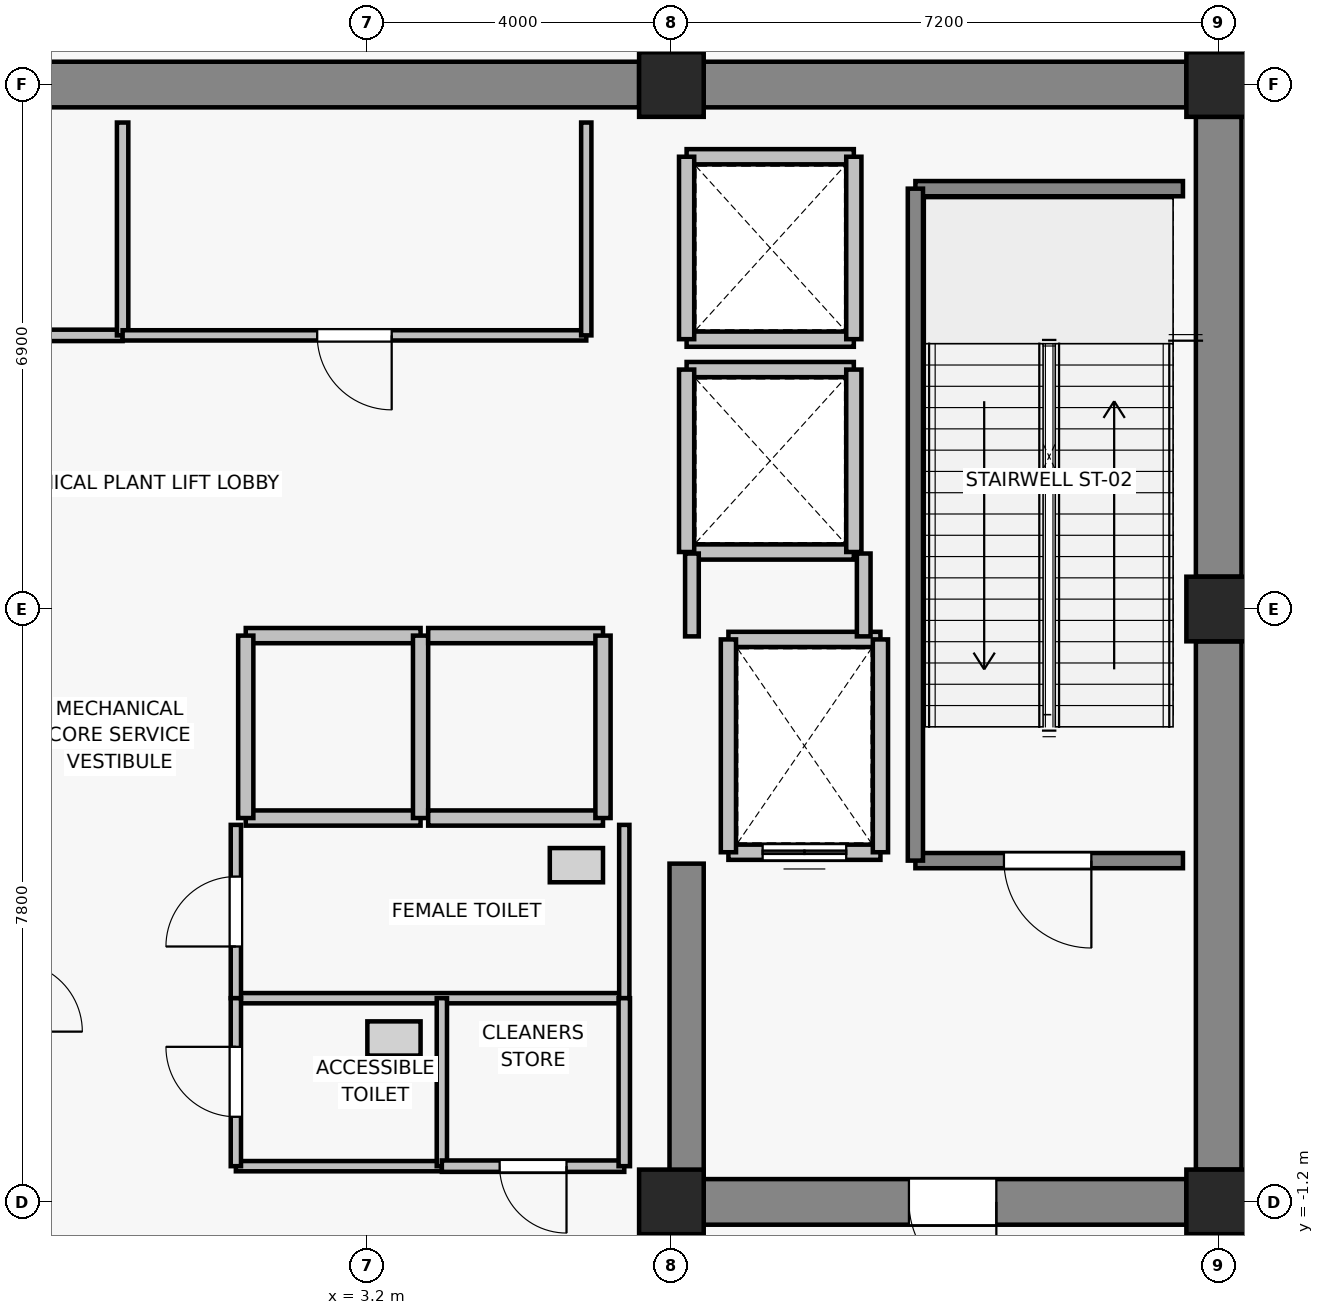
"""IFC4 building model, lengths in metres.
Left out: names, types, materials, properties, quantities, classifications, styles, units other than length and angle.
Written with IfcOpenShell. Run it as: python <this file> out.ifc"""

import sys

from ifc_helpers import new_model, si_unit, direction, frame, frame_2d, origin, origin_2d, place, context, subcontext, project, spatial, rectangle, extrude, source, transform, mapped, element, fill, save


model = new_model("IFC4")
c1 = context("Model", 3, precision=1e-05, world=origin(), true_north=direction((0.0, 1.0)))
c2 = subcontext(c1, "Body", "Model", "MODEL_VIEW")
j1 = project(units=[si_unit("LENGTHUNIT", "METRE"), si_unit("PLANEANGLEUNIT", "RADIAN")], contexts=[c1])
p1 = place(None, origin())
s1 = spatial("IfcSite", under=j1, at=p1, CompositionType="ELEMENT")
p2 = place(p1, origin())
s2 = spatial("IfcBuilding", under=s1, at=p2, CompositionType="ELEMENT")
p3 = place(p2, frame((0.0, 0.0, 199.0)))
s3 = spatial("IfcBuildingStorey", under=s2, at=p3, CompositionType="ELEMENT", Elevation=199.0)
for number, where, z_axis, x_axis in (
    (1, (7.2, -1.2, 0.0), (0.0, 0.0, 1.0), (1.0, 0.0, 0.0)),
    (2, (14.4, -1.2, 0.0), (0.0, 0.0, 1.0), (1.0, 0.0, 0.0)),
    (3, (14.4, 6.6, 0.0), (0.0, 0.0, 1.0), (1.0, 0.0, 0.0)),
    (4, (7.2, 13.5, 0.0), (0.0, 0.0, 1.0), (1.0, 0.0, 0.0)),
    (5, (14.4, 13.5, 0.0), (0.0, 0.0, 1.0), (1.0, 0.0, 0.0)),
):
    element("IfcColumn", number, at=place(p3, frame(where, z_axis=z_axis, x_axis=x_axis)), inside=s3, PredefinedType="COLUMN", context=c2, shape_type="SweptSolid", body=[
        extrude(rectangle(XDim=0.85, YDim=0.85, at=origin_2d()), origin(), (0.0, 0.0, 1.0), 6.6),
    ])
p4 = place(p3, frame((-6.775, 13.5, 0.0), z_axis=(0.0, 0.0, 1.0), x_axis=(1.0, 0.0, 0.0)))
e6 = element("IfcWall", 6, at=p4, inside=s3, PredefinedType="SHEAR", context=c2, shape_type="SweptSolid", body=[
    extrude(rectangle(XDim=13.55, YDim=0.6, at=frame_2d((6.775, 0.0))), origin(), (0.0, 0.0, 1.0), 6.35),
])
p5 = place(p3, frame((7.625, 13.5, 0.0), z_axis=(0.0, 0.0, 1.0), x_axis=(1.0, 0.0, 0.0)))
e7 = element("IfcWall", 7, at=p5, inside=s3, PredefinedType="SHEAR", context=c2, shape_type="SweptSolid", body=[
    extrude(rectangle(XDim=6.35, YDim=0.6, at=frame_2d((3.175, 0.0))), origin(), (0.0, 0.0, 1.0), 6.35),
])
p6 = place(p3, frame((14.4, -0.775, 0.0), z_axis=(0.0, 0.0, 1.0), x_axis=(0.0, 1.0, 0.0)))
e8 = element("IfcWall", 8, at=p6, inside=s3, PredefinedType="SHEAR", context=c2, shape_type="SweptSolid", body=[
    extrude(rectangle(XDim=6.95, YDim=0.6, at=frame_2d((3.475, 0.0))), origin(), (0.0, 0.0, 1.0), 6.35),
])
p7 = place(p3, frame((14.4, 7.025, 0.0), z_axis=(0.0, 0.0, 1.0), x_axis=(0.0, 1.0, 0.0)))
e9 = element("IfcWall", 9, at=p7, inside=s3, PredefinedType="SHEAR", context=c2, shape_type="SweptSolid", body=[
    extrude(rectangle(XDim=6.05, YDim=0.6, at=frame_2d((3.025, 0.0))), origin(), (0.0, 0.0, 1.0), 6.35),
])
p8 = place(p3, frame((13.975, -1.2, 0.0), z_axis=(0.0, 0.0, 1.0), x_axis=(-1.0, 0.0, 0.0)))
e10 = element("IfcWall", 10, at=p8, inside=s3, PredefinedType="SHEAR", context=c2, shape_type="SweptSolid", body=[
    extrude(rectangle(XDim=6.35, YDim=0.6, at=frame_2d((3.175, 0.0))), origin(), (0.0, 0.0, 1.0), 6.35),
])
p9 = place(p8, frame((2.5, 0.0, 0.0)))
e11 = element("IfcOpeningElement", 11, at=p9, cuts=e10, PredefinedType="OPENING", context=c2, shape_type="SweptSolid", body=[
    extrude(rectangle(XDim=1.15, YDim=2.15, at=frame_2d((0.575, 1.075))), frame((0.0, 0.31, 0.0), z_axis=(0.0, -1.0, 0.0), x_axis=(1.0, 0.0, 0.0)), (0.0, 0.0, 1.0), 0.62),
])
p10 = place(p3, frame((7.4, -0.9, 0.0), z_axis=(0.0, 0.0, 1.0), x_axis=(0.0, 1.0, 0.0)))
e12 = element("IfcWall", 12, at=p10, inside=s3, PredefinedType="SHEAR", context=c2, shape_type="SweptSolid", body=[
    extrude(rectangle(XDim=4.15, YDim=0.45, at=frame_2d((2.075, 0.0))), origin(), (0.0, 0.0, 1.0), 6.35),
])
p11 = place(p3, frame((9.95, 3.4, 0.0), z_axis=(0.0, 0.0, 1.0), x_axis=(-1.0, 0.0, 0.0)))
e13 = element("IfcWall", 13, at=p11, inside=s3, PredefinedType="SOLIDWALL", context=c2, shape_type="SweptSolid", body=[
    extrude(rectangle(XDim=2.0, YDim=0.2, at=frame_2d((1.0, 0.0))), origin(), (0.0, 0.0, 1.0), 6.35),
])
p12 = place(p11, frame((0.45, 0.0, 0.0)))
e14 = element("IfcOpeningElement", 14, at=p12, cuts=e13, PredefinedType="OPENING", context=c2, shape_type="SweptSolid", body=[
    extrude(rectangle(XDim=1.1, YDim=2.2, at=frame_2d((0.55, 1.1))), frame((0.0, 0.11, 0.0), z_axis=(0.0, -1.0, 0.0), x_axis=(1.0, 0.0, 0.0)), (0.0, 0.0, 1.0), 0.22),
])
p13 = place(p3, frame((7.95, 6.2, 0.0), z_axis=(0.0, 0.0, 1.0), x_axis=(1.0, 0.0, 0.0)))
e15 = element("IfcWall", 15, at=p13, inside=s3, PredefinedType="SOLIDWALL", context=c2, shape_type="SweptSolid", body=[
    extrude(rectangle(XDim=2.0, YDim=0.2, at=frame_2d((1.0, 0.0))), origin(), (0.0, 0.0, 1.0), 6.35),
])
for number, where, z_axis, x_axis in (
    (16, (7.95, 3.4, 0.0), (0.0, 0.0, 1.0), (0.0, 1.0, 0.0)),
    (17, (9.95, 6.2, 0.0), (0.0, 0.0, 1.0), (0.0, -1.0, 0.0)),
):
    element("IfcWall", number, at=place(p3, frame(where, z_axis=z_axis, x_axis=x_axis)), inside=s3, PredefinedType="SOLIDWALL", context=c2, shape_type="SweptSolid", body=[
        extrude(rectangle(XDim=2.8, YDim=0.2, at=frame_2d((1.4, 0.0))), origin(), (0.0, 0.0, 1.0), 6.35),
    ])
for number, where, z_axis, x_axis in (
    (18, (3.9, 3.85, 0.0), (0.0, 0.0, 1.0), (-1.0, 0.0, 0.0)),
    (19, (1.6, 6.25, 0.0), (0.0, 0.0, 1.0), (1.0, 0.0, 0.0)),
):
    element("IfcWall", number, at=place(p3, frame(where, z_axis=z_axis, x_axis=x_axis)), inside=s3, PredefinedType="SOLIDWALL", context=c2, shape_type="SweptSolid", body=[
        extrude(rectangle(XDim=2.3, YDim=0.2, at=frame_2d((1.15, 0.0))), origin(), (0.0, 0.0, 1.0), 6.35),
    ])
for number, where, z_axis, x_axis in (
    (20, (1.6, 3.85, 0.0), (0.0, 0.0, 1.0), (0.0, 1.0, 0.0)),
    (21, (3.9, 6.25, 0.0), (0.0, 0.0, 1.0), (0.0, -1.0, 0.0)),
):
    element("IfcWall", number, at=place(p3, frame(where, z_axis=z_axis, x_axis=x_axis)), inside=s3, PredefinedType="SOLIDWALL", context=c2, shape_type="SweptSolid", body=[
        extrude(rectangle(XDim=2.4, YDim=0.2, at=frame_2d((1.2, 0.0))), origin(), (0.0, 0.0, 1.0), 6.35),
    ])
for number, where, z_axis, x_axis in (
    (22, (6.3, 3.85, 0.0), (0.0, 0.0, 1.0), (-1.0, 0.0, 0.0)),
    (23, (4.0, 6.25, 0.0), (0.0, 0.0, 1.0), (1.0, 0.0, 0.0)),
):
    element("IfcWall", number, at=place(p3, frame(where, z_axis=z_axis, x_axis=x_axis)), inside=s3, PredefinedType="SOLIDWALL", context=c2, shape_type="SweptSolid", body=[
        extrude(rectangle(XDim=2.3, YDim=0.2, at=frame_2d((1.15, 0.0))), origin(), (0.0, 0.0, 1.0), 6.35),
    ])
p14 = place(p3, frame((6.3, 6.25, 0.0), z_axis=(0.0, 0.0, 1.0), x_axis=(0.0, -1.0, 0.0)))
e24 = element("IfcWall", 24, at=p14, inside=s3, PredefinedType="SOLIDWALL", context=c2, shape_type="SweptSolid", body=[
    extrude(rectangle(XDim=2.4, YDim=0.2, at=frame_2d((1.2, 0.0))), origin(), (0.0, 0.0, 1.0), 6.35),
])
for number, where, z_axis, x_axis in (
    (25, (9.6, 7.35, 0.0), (0.0, 0.0, 1.0), (-1.0, 0.0, 0.0)),
    (26, (7.4, 9.75, 0.0), (0.0, 0.0, 1.0), (1.0, 0.0, 0.0)),
):
    element("IfcWall", number, at=place(p3, frame(where, z_axis=z_axis, x_axis=x_axis)), inside=s3, PredefinedType="SOLIDWALL", context=c2, shape_type="SweptSolid", body=[
        extrude(rectangle(XDim=2.2, YDim=0.2, at=frame_2d((1.1, 0.0))), origin(), (0.0, 0.0, 1.0), 5.89),
    ])
p15 = place(p3, frame((7.4, 7.35, 0.0), z_axis=(0.0, 0.0, 1.0), x_axis=(0.0, 1.0, 0.0)))
e27 = element("IfcWall", 27, at=p15, inside=s3, PredefinedType="SOLIDWALL", context=c2, shape_type="SweptSolid", body=[
    extrude(rectangle(XDim=2.4, YDim=0.2, at=frame_2d((1.2, 0.0))), origin(), (0.0, 0.0, 1.0), 5.89),
])
p16 = place(p3, frame((9.6, 9.75, 0.0), z_axis=(0.0, 0.0, 1.0), x_axis=(0.0, -1.0, 0.0)))
e28 = element("IfcWall", 28, at=p16, inside=s3, PredefinedType="SOLIDWALL", context=c2, shape_type="SweptSolid", body=[
    extrude(rectangle(XDim=2.4, YDim=0.2, at=frame_2d((1.2, 0.0))), origin(), (0.0, 0.0, 1.0), 6.35),
])
for number, where, z_axis, x_axis in (
    (29, (9.6, 10.15, 0.0), (0.0, 0.0, 1.0), (-1.0, 0.0, 0.0)),
    (30, (7.4, 12.55, 0.0), (0.0, 0.0, 1.0), (1.0, 0.0, 0.0)),
):
    element("IfcWall", number, at=place(p3, frame(where, z_axis=z_axis, x_axis=x_axis)), inside=s3, PredefinedType="SOLIDWALL", context=c2, shape_type="SweptSolid", body=[
        extrude(rectangle(XDim=2.2, YDim=0.2, at=frame_2d((1.1, 0.0))), origin(), (0.0, 0.0, 1.0), 5.89),
    ])
p17 = place(p3, frame((7.4, 10.15, 0.0), z_axis=(0.0, 0.0, 1.0), x_axis=(0.0, 1.0, 0.0)))
e31 = element("IfcWall", 31, at=p17, inside=s3, PredefinedType="SOLIDWALL", context=c2, shape_type="SweptSolid", body=[
    extrude(rectangle(XDim=2.4, YDim=0.2, at=frame_2d((1.2, 0.0))), origin(), (0.0, 0.0, 1.0), 5.89),
])
p18 = place(p3, frame((9.6, 12.55, 0.0), z_axis=(0.0, 0.0, 1.0), x_axis=(0.0, -1.0, 0.0)))
e32 = element("IfcWall", 32, at=p18, inside=s3, PredefinedType="SOLIDWALL", context=c2, shape_type="SweptSolid", body=[
    extrude(rectangle(XDim=2.4, YDim=0.2, at=frame_2d((1.2, 0.0))), origin(), (0.0, 0.0, 1.0), 6.35),
])
p19 = place(p3, frame((13.93, 3.29, 0.0), z_axis=(0.0, 0.0, 1.0), x_axis=(-1.0, 0.0, 0.0)))
e33 = element("IfcWall", 33, at=p19, inside=s3, PredefinedType="SOLIDWALL", context=c2, shape_type="SweptSolid", body=[
    extrude(rectangle(XDim=3.52, YDim=0.2, at=frame_2d((1.76, 0.0))), origin(), (0.0, 0.0, 1.0), 6.35),
])
p20 = place(p19, frame((1.205, 0.0, 0.0)))
e34 = element("IfcOpeningElement", 34, at=p20, cuts=e33, PredefinedType="OPENING", context=c2, shape_type="SweptSolid", body=[
    extrude(rectangle(XDim=1.15, YDim=2.15, at=frame_2d((0.575, 1.075))), frame((0.0, 0.11, 0.0), z_axis=(0.0, -1.0, 0.0), x_axis=(1.0, 0.0, 0.0)), (0.0, 0.0, 1.0), 0.22),
])
p21 = place(p3, frame((10.41, 12.13, 0.0), z_axis=(0.0, 0.0, 1.0), x_axis=(1.0, 0.0, 0.0)))
e35 = element("IfcWall", 35, at=p21, inside=s3, PredefinedType="SOLIDWALL", context=c2, shape_type="SweptSolid", body=[
    extrude(rectangle(XDim=3.52, YDim=0.2, at=frame_2d((1.76, 0.0))), origin(), (0.0, 0.0, 1.0), 6.35),
])
p22 = place(p3, frame((10.41, 3.29, 0.0), z_axis=(0.0, 0.0, 1.0), x_axis=(0.0, 1.0, 0.0)))
e36 = element("IfcWall", 36, at=p22, inside=s3, PredefinedType="SOLIDWALL", context=c2, shape_type="SweptSolid", body=[
    extrude(rectangle(XDim=8.84, YDim=0.2, at=frame_2d((4.42, 0.0))), origin(), (0.0, 0.0, 1.0), 6.35),
])
p23 = place(p3, frame((7.47, 6.24, 0.0), z_axis=(0.0, 0.0, 1.0), x_axis=(0.0, 1.0, 0.0)))
e37 = element("IfcWall", 37, at=p23, inside=s3, PredefinedType="PARTITIONING", context=c2, shape_type="SweptSolid", body=[
    extrude(rectangle(XDim=1.09, YDim=0.18, at=frame_2d((0.545, 0.0))), origin(), (0.0, 0.0, 1.0), 5.89),
])
p24 = place(p3, frame((9.73, 7.33, 0.0), z_axis=(0.0, 0.0, 1.0), x_axis=(0.0, -1.0, 0.0)))
e38 = element("IfcWall", 38, at=p24, inside=s3, PredefinedType="PARTITIONING", context=c2, shape_type="SweptSolid", body=[
    extrude(rectangle(XDim=1.09, YDim=0.18, at=frame_2d((0.545, 0.0))), origin(), (0.0, 0.0, 1.0), 6.35),
])
p25 = place(p3, frame((-0.02, 10.2, 0.0), z_axis=(0.0, 0.0, 1.0), x_axis=(-1.0, 0.0, 0.0)))
e39 = element("IfcWall", 39, at=p25, inside=s3, PredefinedType="PARTITIONING", context=c2, shape_type="SweptSolid", body=[
    extrude(rectangle(XDim=6.06, YDim=0.15, at=frame_2d((3.03, 0.0))), origin(), (0.0, 0.0, 1.0), 5.89),
])
p26 = place(p25, frame((2.54, 0.0, 0.0)))
e40 = element("IfcOpeningElement", 40, at=p26, cuts=e39, PredefinedType="OPENING", context=c2, shape_type="SweptSolid", body=[
    extrude(rectangle(XDim=0.98, YDim=2.15, at=frame_2d((0.49, 1.075))), frame((0.0, 0.085, 0.0), z_axis=(0.0, -1.0, 0.0), x_axis=(1.0, 0.0, 0.0)), (0.0, 0.0, 1.0), 0.17),
])
p27 = place(p3, frame((-0.02, 13.0, 0.0), z_axis=(0.0, 0.0, 1.0), x_axis=(0.0, -1.0, 0.0)))
e41 = element("IfcWall", 41, at=p27, inside=s3, PredefinedType="PARTITIONING", context=c2, shape_type="SweptSolid", body=[
    extrude(rectangle(XDim=2.8, YDim=0.15, at=frame_2d((1.4, 0.0))), origin(), (0.0, 0.0, 1.0), 5.89),
])
p28 = place(p3, frame((6.08, 10.2, 0.0), z_axis=(0.0, 0.0, 1.0), x_axis=(-1.0, 0.0, 0.0)))
e42 = element("IfcWall", 42, at=p28, inside=s3, PredefinedType="PARTITIONING", context=c2, shape_type="SweptSolid", body=[
    extrude(rectangle(XDim=6.1, YDim=0.135, at=frame_2d((3.05, 0.0))), origin(), (0.0, 0.0, 1.0), 5.89),
])
p29 = place(p28, frame((2.56, 0.0, 0.0)))
e43 = element("IfcOpeningElement", 43, at=p29, cuts=e42, PredefinedType="OPENING", context=c2, shape_type="SweptSolid", body=[
    extrude(rectangle(XDim=0.98, YDim=2.15, at=frame_2d((0.49, 1.075))), frame((0.0, 0.077, 0.0), z_axis=(0.0, -1.0, 0.0), x_axis=(1.0, 0.0, 0.0)), (0.0, 0.0, 1.0), 0.155),
])
p30 = place(p3, frame((6.08, 13.0, 0.0), z_axis=(0.0, 0.0, 1.0), x_axis=(0.0, -1.0, 0.0)))
e44 = element("IfcWall", 44, at=p30, inside=s3, PredefinedType="PARTITIONING", context=c2, shape_type="SweptSolid", body=[
    extrude(rectangle(XDim=2.8, YDim=0.135, at=frame_2d((1.4, 0.0))), origin(), (0.0, 0.0, 1.0), 6.35),
])
p31 = place(p3, frame((6.58, 1.48, 0.0), z_axis=(0.0, 0.0, 1.0), x_axis=(-1.0, 0.0, 0.0)))
e45 = element("IfcWall", 45, at=p31, inside=s3, PredefinedType="PARTITIONING", context=c2, shape_type="SweptSolid", body=[
    extrude(rectangle(XDim=5.11, YDim=0.135, at=frame_2d((2.555, 0.0))), origin(), (0.0, 0.0, 1.0), 6.35),
])
p32 = place(p3, frame((1.47, 1.48, 0.0), z_axis=(0.0, 0.0, 1.0), x_axis=(0.0, 1.0, 0.0)))
e46 = element("IfcWall", 46, at=p32, inside=s3, PredefinedType="PARTITIONING", context=c2, shape_type="SweptSolid", body=[
    extrude(rectangle(XDim=2.28, YDim=0.135, at=frame_2d((1.14, 0.0))), origin(), (0.0, 0.0, 1.0), 6.35),
])
p33 = place(p32, frame((0.68, 0.0, 0.0)))
e47 = element("IfcOpeningElement", 47, at=p33, cuts=e46, PredefinedType="OPENING", context=c2, shape_type="SweptSolid", body=[
    extrude(rectangle(XDim=0.92, YDim=2.1, at=frame_2d((0.46, 1.05))), frame((0.0, 0.077, 0.0), z_axis=(0.0, -1.0, 0.0), x_axis=(1.0, 0.0, 0.0)), (0.0, 0.0, 1.0), 0.155),
])
p34 = place(p3, frame((6.58, 3.76, 0.0), z_axis=(0.0, 0.0, 1.0), x_axis=(0.0, -1.0, 0.0)))
e48 = element("IfcWall", 48, at=p34, inside=s3, PredefinedType="PARTITIONING", context=c2, shape_type="SweptSolid", body=[
    extrude(rectangle(XDim=2.28, YDim=0.135, at=frame_2d((1.14, 0.0))), origin(), (0.0, 0.0, 1.0), 6.35),
])
p35 = place(p3, frame((4.18, -0.73, 0.0), z_axis=(0.0, 0.0, 1.0), x_axis=(-1.0, 0.0, 0.0)))
e49 = element("IfcWall", 49, at=p35, inside=s3, PredefinedType="PARTITIONING", context=c2, shape_type="SweptSolid", body=[
    extrude(rectangle(XDim=2.71, YDim=0.135, at=frame_2d((1.355, 0.0))), origin(), (0.0, 0.0, 1.0), 6.35),
])
p36 = place(p3, frame((1.47, -0.73, 0.0), z_axis=(0.0, 0.0, 1.0), x_axis=(0.0, 1.0, 0.0)))
e50 = element("IfcWall", 50, at=p36, inside=s3, PredefinedType="PARTITIONING", context=c2, shape_type="SweptSolid", body=[
    extrude(rectangle(XDim=2.21, YDim=0.135, at=frame_2d((1.105, 0.0))), origin(), (0.0, 0.0, 1.0), 6.35),
])
p37 = place(p36, frame((0.65, 0.0, 0.0)))
e51 = element("IfcOpeningElement", 51, at=p37, cuts=e50, PredefinedType="OPENING", context=c2, shape_type="SweptSolid", body=[
    extrude(rectangle(XDim=0.92, YDim=2.1, at=frame_2d((0.46, 1.05))), frame((0.0, 0.077, 0.0), z_axis=(0.0, -1.0, 0.0), x_axis=(1.0, 0.0, 0.0)), (0.0, 0.0, 1.0), 0.155),
])
p38 = place(p3, frame((4.18, 1.48, 0.0), z_axis=(0.0, 0.0, 1.0), x_axis=(0.0, -1.0, 0.0)))
e52 = element("IfcWall", 52, at=p38, inside=s3, PredefinedType="PARTITIONING", context=c2, shape_type="SweptSolid", body=[
    extrude(rectangle(XDim=2.21, YDim=0.135, at=frame_2d((1.105, 0.0))), origin(), (0.0, 0.0, 1.0), 6.35),
])
p39 = place(p3, frame((6.58, -0.73, 0.0), z_axis=(0.0, 0.0, 1.0), x_axis=(-1.0, 0.0, 0.0)))
e53 = element("IfcWall", 53, at=p39, inside=s3, PredefinedType="PARTITIONING", context=c2, shape_type="SweptSolid", body=[
    extrude(rectangle(XDim=2.4, YDim=0.15, at=frame_2d((1.2, 0.0))), origin(), (0.0, 0.0, 1.0), 6.35),
])
p40 = place(p39, frame((0.76, 0.0, 0.0)))
e54 = element("IfcOpeningElement", 54, at=p40, cuts=e53, PredefinedType="OPENING", context=c2, shape_type="SweptSolid", body=[
    extrude(rectangle(XDim=0.88, YDim=2.1, at=frame_2d((0.44, 1.05))), frame((0.0, 0.085, 0.0), z_axis=(0.0, -1.0, 0.0), x_axis=(1.0, 0.0, 0.0)), (0.0, 0.0, 1.0), 0.17),
])
p41 = place(p3, frame((6.58, 1.48, 0.0), z_axis=(0.0, 0.0, 1.0), x_axis=(0.0, -1.0, 0.0)))
e55 = element("IfcWall", 55, at=p41, inside=s3, PredefinedType="PARTITIONING", context=c2, shape_type="SweptSolid", body=[
    extrude(rectangle(XDim=2.21, YDim=0.15, at=frame_2d((1.105, 0.0))), origin(), (0.0, 0.0, 1.0), 6.35),
])
m1 = source(origin(), c2, "Body", "SweptSolid", [
    extrude(rectangle(XDim=1.1, YDim=2.2, at=frame_2d((0.55, 1.1))), frame((0.0, 0.025, 0.0), z_axis=(0.0, -1.0, 0.0), x_axis=(1.0, 0.0, 0.0)), (0.0, 0.0, 1.0), 0.05),
])
p42 = place(p12, origin())
e56 = element("IfcDoor", 56, at=p42, inside=s3, OperationType="DOUBLE_DOOR_SLIDING", PredefinedType="DOOR", context=c2, shape_type="MappedRepresentation", body=[
    mapped(m1, transform((0.0, 0.0, 0.0), x_axis=(1.0, 0.0, 0.0), y_axis=(0.0, 1.0, 0.0), z_axis=(0.0, 0.0, 1.0), scale=1.0)),
])
fill(e14, e56)
m2 = source(origin(), c2, "Body", "SweptSolid", [
    extrude(rectangle(XDim=1.15, YDim=2.15, at=frame_2d((0.575, 1.075))), frame((0.0, 0.025, 0.0), z_axis=(0.0, -1.0, 0.0), x_axis=(1.0, 0.0, 0.0)), (0.0, 0.0, 1.0), 0.05),
])
p43 = place(p20, origin())
e57 = element("IfcDoor", 57, at=p43, inside=s3, OperationType="SINGLE_SWING_LEFT", PredefinedType="DOOR", context=c2, shape_type="MappedRepresentation", body=[
    mapped(m2, transform((0.0, 0.0, 0.0), x_axis=(1.0, 0.0, 0.0), y_axis=(0.0, 1.0, 0.0), z_axis=(0.0, 0.0, 1.0), scale=1.0)),
])
fill(e34, e57)
p44 = place(p9, origin())
e58 = element("IfcDoor", 58, at=p44, inside=s3, OperationType="SINGLE_SWING_LEFT", PredefinedType="DOOR", context=c2, shape_type="MappedRepresentation", body=[
    mapped(m2, transform((0.0, 0.0, 0.0), x_axis=(1.0, 0.0, 0.0), y_axis=(0.0, 1.0, 0.0), z_axis=(0.0, 0.0, 1.0), scale=1.0)),
])
fill(e11, e58)
m3 = source(origin(), c2, "Body", "SweptSolid", [
    extrude(rectangle(XDim=0.98, YDim=2.15, at=frame_2d((0.49, 1.075))), frame((0.0, 0.025, 0.0), z_axis=(0.0, -1.0, 0.0), x_axis=(1.0, 0.0, 0.0)), (0.0, 0.0, 1.0), 0.05),
])
p45 = place(p29, origin())
e59 = element("IfcDoor", 59, at=p45, inside=s3, OperationType="SINGLE_SWING_LEFT", PredefinedType="DOOR", context=c2, shape_type="MappedRepresentation", body=[
    mapped(m3, transform((0.0, 0.0, 0.0), x_axis=(1.0, 0.0, 0.0), y_axis=(0.0, 1.0, 0.0), z_axis=(0.0, 0.0, 1.0), scale=1.0)),
])
fill(e43, e59)
m4 = source(origin(), c2, "Body", "SweptSolid", [
    extrude(rectangle(XDim=0.92, YDim=2.1, at=frame_2d((0.46, 1.05))), frame((0.0, 0.025, 0.0), z_axis=(0.0, -1.0, 0.0), x_axis=(1.0, 0.0, 0.0)), (0.0, 0.0, 1.0), 0.05),
])
p46 = place(p33, origin())
e60 = element("IfcDoor", 60, at=p46, inside=s3, OperationType="SINGLE_SWING_LEFT", PredefinedType="DOOR", context=c2, shape_type="MappedRepresentation", body=[
    mapped(m4, transform((0.0, 0.0, 0.0), x_axis=(1.0, 0.0, 0.0), y_axis=(0.0, 1.0, 0.0), z_axis=(0.0, 0.0, 1.0), scale=1.0)),
])
fill(e47, e60)
p47 = place(p37, origin())
e61 = element("IfcDoor", 61, at=p47, inside=s3, OperationType="SINGLE_SWING_RIGHT", PredefinedType="DOOR", context=c2, shape_type="MappedRepresentation", body=[
    mapped(m4, transform((0.0, 0.0, 0.0), x_axis=(1.0, 0.0, 0.0), y_axis=(0.0, 1.0, 0.0), z_axis=(0.0, 0.0, 1.0), scale=1.0)),
])
fill(e51, e61)
m5 = source(origin(), c2, "Body", "SweptSolid", [
    extrude(rectangle(XDim=0.88, YDim=2.1, at=frame_2d((0.44, 1.05))), frame((0.0, 0.025, 0.0), z_axis=(0.0, -1.0, 0.0), x_axis=(1.0, 0.0, 0.0)), (0.0, 0.0, 1.0), 0.05),
])
p48 = place(p40, origin())
e62 = element("IfcDoor", 62, at=p48, inside=s3, OperationType="SINGLE_SWING_LEFT", PredefinedType="DOOR", context=c2, shape_type="MappedRepresentation", body=[
    mapped(m5, transform((0.0, 0.0, 0.0), x_axis=(1.0, 0.0, 0.0), y_axis=(0.0, 1.0, 0.0), z_axis=(0.0, 0.0, 1.0), scale=1.0)),
])
fill(e54, e62)
save(model, sys.argv[1])
